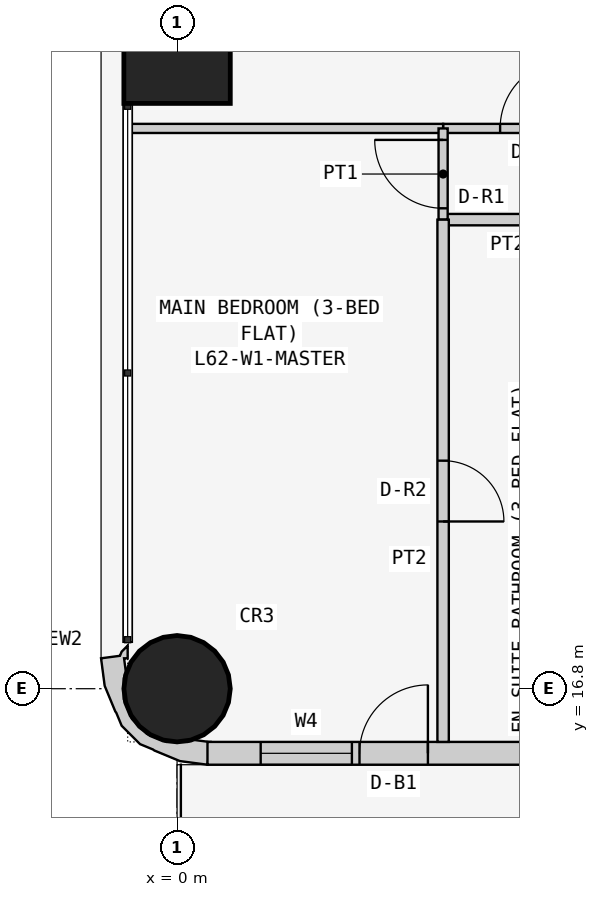
"""IFC4 building model, lengths in metres.
Left out: names, types, materials, properties, quantities, classifications, styles, units other than length and angle.
Written with IfcOpenShell. Run it as: python <this file> out.ifc"""

import sys

from ifc_helpers import new_model, si_unit, direction, frame, frame_2d, origin, origin_2d, place, context, subcontext, project, spatial, polyline, rectangle, circle, outline, extrude, element, fill, save


model = new_model("IFC4")
c1 = context("Model", 3, precision=1e-05, world=origin(), true_north=direction((0.0, 1.0)))
c2 = subcontext(c1, "Body", "Model", "MODEL_VIEW")
j1 = project(units=[si_unit("LENGTHUNIT", "METRE"), si_unit("PLANEANGLEUNIT", "RADIAN")], contexts=[c1])
p1 = place(None, origin())
s1 = spatial("IfcSite", under=j1, at=p1, CompositionType="ELEMENT")
p2 = place(p1, origin())
s2 = spatial("IfcBuilding", under=s1, at=p2, CompositionType="ELEMENT")
p3 = place(p2, frame((0.0, 0.0, 237.3)))
s3 = spatial("IfcBuildingStorey", under=s2, at=p3, CompositionType="ELEMENT", Elevation=237.3)
p4 = place(p3, frame((0.0, 16.8, 0.0), z_axis=(0.0, 0.0, 1.0), x_axis=(1.0, 0.0, 0.0)))
e1 = element("IfcColumn", 1, at=p4, inside=s3, PredefinedType="COLUMN", context=c2, shape_type="SweptSolid", body=[
    extrude(circle(Radius=0.7, at=origin_2d()), origin(), (0.0, 0.0, 1.0), 3.6),
])
p5 = place(p3, frame((0.0, 25.2, 0.0), z_axis=(0.0, 0.0, 1.0), x_axis=(1.0, 0.0, 0.0)))
e2 = element("IfcColumn", 2, at=p5, inside=s3, PredefinedType="COLUMN", context=c2, shape_type="SweptSolid", body=[
    extrude(rectangle(XDim=1.4, YDim=1.4, at=origin_2d()), origin(), (0.0, 0.0, 1.0), 3.6),
])
p6 = place(p3, frame((0.4, 15.95, 0.0), z_axis=(0.0, 0.0, 1.0), x_axis=(1.0, 0.0, 0.0)))
e3 = element("IfcWall", 3, at=p6, inside=s3, PredefinedType="SOLIDWALL", context=c2, shape_type="SweptSolid", body=[
    extrude(rectangle(XDim=15.7, YDim=0.3, at=frame_2d((7.85, 0.0))), origin(), (0.0, 0.0, 1.0), 3.45),
])
p7 = place(p6, frame((12.4, 0.0, 0.9)))
e4 = element("IfcOpeningElement", 4, at=p7, cuts=e3, PredefinedType="OPENING", context=c2, shape_type="SweptSolid", body=[
    extrude(rectangle(XDim=1.8, YDim=1.5, at=frame_2d((0.9, 0.75))), frame((0.0, 0.16, 0.0), z_axis=(0.0, -1.0, 0.0), x_axis=(1.0, 0.0, 0.0)), (0.0, 0.0, 1.0), 0.32),
])
p8 = place(p6, frame((9.55, 0.0, 1.5)))
e5 = element("IfcOpeningElement", 5, at=p8, cuts=e3, PredefinedType="OPENING", context=c2, shape_type="SweptSolid", body=[
    extrude(rectangle(XDim=0.9, YDim=0.7, at=frame_2d((0.45, 0.35))), frame((0.0, 0.16, 0.0), z_axis=(0.0, -1.0, 0.0), x_axis=(1.0, 0.0, 0.0)), (0.0, 0.0, 1.0), 0.32),
])
p9 = place(p6, frame((5.1, 0.0, 0.9)))
e6 = element("IfcOpeningElement", 6, at=p9, cuts=e3, PredefinedType="OPENING", context=c2, shape_type="SweptSolid", body=[
    extrude(rectangle(XDim=1.8, YDim=1.5, at=frame_2d((0.9, 0.75))), frame((0.0, 0.16, 0.0), z_axis=(0.0, -1.0, 0.0), x_axis=(1.0, 0.0, 0.0)), (0.0, 0.0, 1.0), 0.32),
])
p10 = place(p6, frame((2.0, 0.0, 0.0)))
e7 = element("IfcOpeningElement", 7, at=p10, cuts=e3, PredefinedType="OPENING", context=c2, shape_type="SweptSolid", body=[
    extrude(rectangle(XDim=0.9, YDim=2.4, at=frame_2d((0.45, 1.2))), frame((0.0, 0.16, 0.0), z_axis=(0.0, -1.0, 0.0), x_axis=(1.0, 0.0, 0.0)), (0.0, 0.0, 1.0), 0.32),
])
p11 = place(p6, frame((0.7, 0.0, 0.9)))
e8 = element("IfcOpeningElement", 8, at=p11, cuts=e3, PredefinedType="OPENING", context=c2, shape_type="SweptSolid", body=[
    extrude(rectangle(XDim=1.2, YDim=1.5, at=frame_2d((0.6, 0.75))), frame((0.0, 0.16, 0.0), z_axis=(0.0, -1.0, 0.0), x_axis=(1.0, 0.0, 0.0)), (0.0, 0.0, 1.0), 0.32),
])
p12 = place(p3, frame((-0.588, 17.312, 0.0), z_axis=(0.0, 0.0, 1.0), x_axis=(-0.898030234854, -0.439933741929, 0.0)))
e9 = element("IfcWall", 9, at=p12, inside=s3, PredefinedType="SOLIDWALL", context=c2, shape_type="SweptSolid", body=[
    extrude(outline(polyline([(-0.222, 1.793), (-0.39, 1.541), (-0.372, 1.532), (-0.195, 1.415), (-0.12, 1.41), (0.131, 1.287), (0.315, 1.078), (0.406, 0.814), (0.388, 0.536), (0.265, 0.285), (0.209, 0.236), (0.148, 0.053), (0.105, 0.074), (0.032, -0.076), (0.138, -0.039), (0.182, -0.0), (0.419, -0.08), (0.536, 0.266), (0.559, 0.631), (0.555, 0.651), (0.566, 0.836), (0.456, 1.159), (0.333, 1.298), (0.324, 1.316), (0.082, 1.591), (-0.222, 1.793)])), origin(), (0.0, 0.0, 1.0), 3.45),
])
p13 = place(p3, frame((3.5, 24.171, 0.0), z_axis=(0.0, 0.0, 1.0), x_axis=(1.0, 0.0, 0.0)))
e10 = element("IfcWall", 10, at=p13, inside=s3, PredefinedType="PARTITIONING", context=c2, shape_type="SweptSolid", body=[
    extrude(rectangle(XDim=4.05, YDim=0.12, at=frame_2d((2.025, 0.0))), origin(), (0.0, 0.0, 1.0), 3.45),
])
p14 = place(p13, frame((0.75, 0.0, 0.0)))
e11 = element("IfcOpeningElement", 11, at=p14, cuts=e10, PredefinedType="OPENING", context=c2, shape_type="SweptSolid", body=[
    extrude(rectangle(XDim=0.9, YDim=2.1, at=frame_2d((0.45, 1.05))), frame((0.0, 0.07, 0.0), z_axis=(0.0, -1.0, 0.0), x_axis=(1.0, 0.0, 0.0)), (0.0, 0.0, 1.0), 0.14),
])
p15 = place(p3, frame((-0.65, 24.171, 0.0), z_axis=(0.0, 0.0, 1.0), x_axis=(1.0, 0.0, 0.0)))
e12 = element("IfcWall", 12, at=p15, inside=s3, PredefinedType="PARTITIONING", context=c2, shape_type="SweptSolid", body=[
    extrude(rectangle(XDim=4.15, YDim=0.12, at=frame_2d((2.075, 0.0))), origin(), (0.0, 0.0, 1.0), 3.45),
])
p16 = place(p3, frame((3.5, 22.971, 0.0), z_axis=(0.0, 0.0, 1.0), x_axis=(1.0, 0.0, 0.0)))
e13 = element("IfcWall", 13, at=p16, inside=s3, PredefinedType="PARTITIONING", context=c2, shape_type="SweptSolid", body=[
    extrude(rectangle(XDim=1.7, YDim=0.15, at=frame_2d((0.85, 0.0))), origin(), (0.0, 0.0, 1.0), 3.45),
])
p17 = place(p3, frame((3.5, 24.171, 0.0), z_axis=(0.0, 0.0, 1.0), x_axis=(0.0, -1.0, 0.0)))
e14 = element("IfcWall", 14, at=p17, inside=s3, PredefinedType="PARTITIONING", context=c2, shape_type="SweptSolid", body=[
    extrude(rectangle(XDim=1.2, YDim=0.12, at=frame_2d((0.6, 0.0))), origin(), (0.0, 0.0, 1.0), 3.45),
])
p18 = place(p17, frame((0.151, 0.0, 0.0)))
e15 = element("IfcOpeningElement", 15, at=p18, cuts=e14, PredefinedType="OPENING", context=c2, shape_type="SweptSolid", body=[
    extrude(rectangle(XDim=0.9, YDim=2.1, at=frame_2d((0.45, 1.05))), frame((0.0, 0.07, 0.0), z_axis=(0.0, -1.0, 0.0), x_axis=(1.0, 0.0, 0.0)), (0.0, 0.0, 1.0), 0.14),
])
p19 = place(p3, frame((3.5, 22.971, 0.0), z_axis=(0.0, 0.0, 1.0), x_axis=(0.0, -1.0, 0.0)))
e16 = element("IfcWall", 16, at=p19, inside=s3, PredefinedType="PARTITIONING", context=c2, shape_type="SweptSolid", body=[
    extrude(rectangle(XDim=6.871, YDim=0.15, at=frame_2d((3.436, 0.0))), origin(), (0.0, 0.0, 1.0), 3.45),
])
p20 = place(p19, frame((3.171, 0.0, 0.0)))
e17 = element("IfcOpeningElement", 17, at=p20, cuts=e16, PredefinedType="OPENING", context=c2, shape_type="SweptSolid", body=[
    extrude(rectangle(XDim=0.8, YDim=2.1, at=frame_2d((0.4, 1.05))), frame((0.0, 0.085, 0.0), z_axis=(0.0, -1.0, 0.0), x_axis=(1.0, 0.0, 0.0)), (0.0, 0.0, 1.0), 0.17),
])
p21 = place(p10, origin())
e18 = element("IfcDoor", 18, at=p21, inside=s3, OperationType="SINGLE_SWING_RIGHT", PredefinedType="DOOR", context=c2, shape_type="SweptSolid", body=[
    extrude(rectangle(XDim=0.9, YDim=2.4, at=frame_2d((0.45, 1.2))), frame((0.0, 0.025, 0.0), z_axis=(0.0, -1.0, 0.0), x_axis=(1.0, 0.0, 0.0)), (0.0, 0.0, 1.0), 0.05),
])
fill(e7, e18)
p22 = place(p11, origin())
e19 = element("IfcWindow", 19, at=p22, inside=s3, PartitioningType="SINGLE_PANEL", PredefinedType="WINDOW", context=c2, shape_type="SweptSolid", body=[
    extrude(rectangle(XDim=1.2, YDim=1.5, at=frame_2d((0.6, 0.75))), frame((0.0, 0.03, 0.0), z_axis=(0.0, -1.0, 0.0), x_axis=(1.0, 0.0, 0.0)), (0.0, 0.0, 1.0), 0.06),
])
fill(e8, e19)
p23 = place(p14, origin())
e20 = element("IfcDoor", 20, at=p23, inside=s3, OperationType="SINGLE_SWING_RIGHT", PredefinedType="DOOR", context=c2, shape_type="SweptSolid", body=[
    extrude(rectangle(XDim=0.9, YDim=2.1, at=frame_2d((0.45, 1.05))), frame((0.0, 0.025, 0.0), z_axis=(0.0, -1.0, 0.0), x_axis=(1.0, 0.0, 0.0)), (0.0, 0.0, 1.0), 0.05),
])
fill(e11, e20)
p24 = place(p18, frame((0.9, 0.0, 0.0), z_axis=(0.0, 0.0, 1.0), x_axis=(-1.0, 0.0, 0.0)))
e21 = element("IfcDoor", 21, at=p24, inside=s3, OperationType="SINGLE_SWING_RIGHT", PredefinedType="DOOR", context=c2, shape_type="SweptSolid", body=[
    extrude(rectangle(XDim=0.9, YDim=2.1, at=frame_2d((0.45, 1.05))), frame((0.0, 0.025, 0.0), z_axis=(0.0, -1.0, 0.0), x_axis=(1.0, 0.0, 0.0)), (0.0, 0.0, 1.0), 0.05),
])
fill(e15, e21)
p25 = place(p20, origin())
e22 = element("IfcDoor", 22, at=p25, inside=s3, OperationType="SINGLE_SWING_RIGHT", PredefinedType="DOOR", context=c2, shape_type="SweptSolid", body=[
    extrude(rectangle(XDim=0.8, YDim=2.1, at=frame_2d((0.4, 1.05))), frame((0.0, 0.025, 0.0), z_axis=(0.0, -1.0, 0.0), x_axis=(1.0, 0.0, 0.0)), (0.0, 0.0, 1.0), 0.05),
])
fill(e17, e22)
save(model, sys.argv[1])
